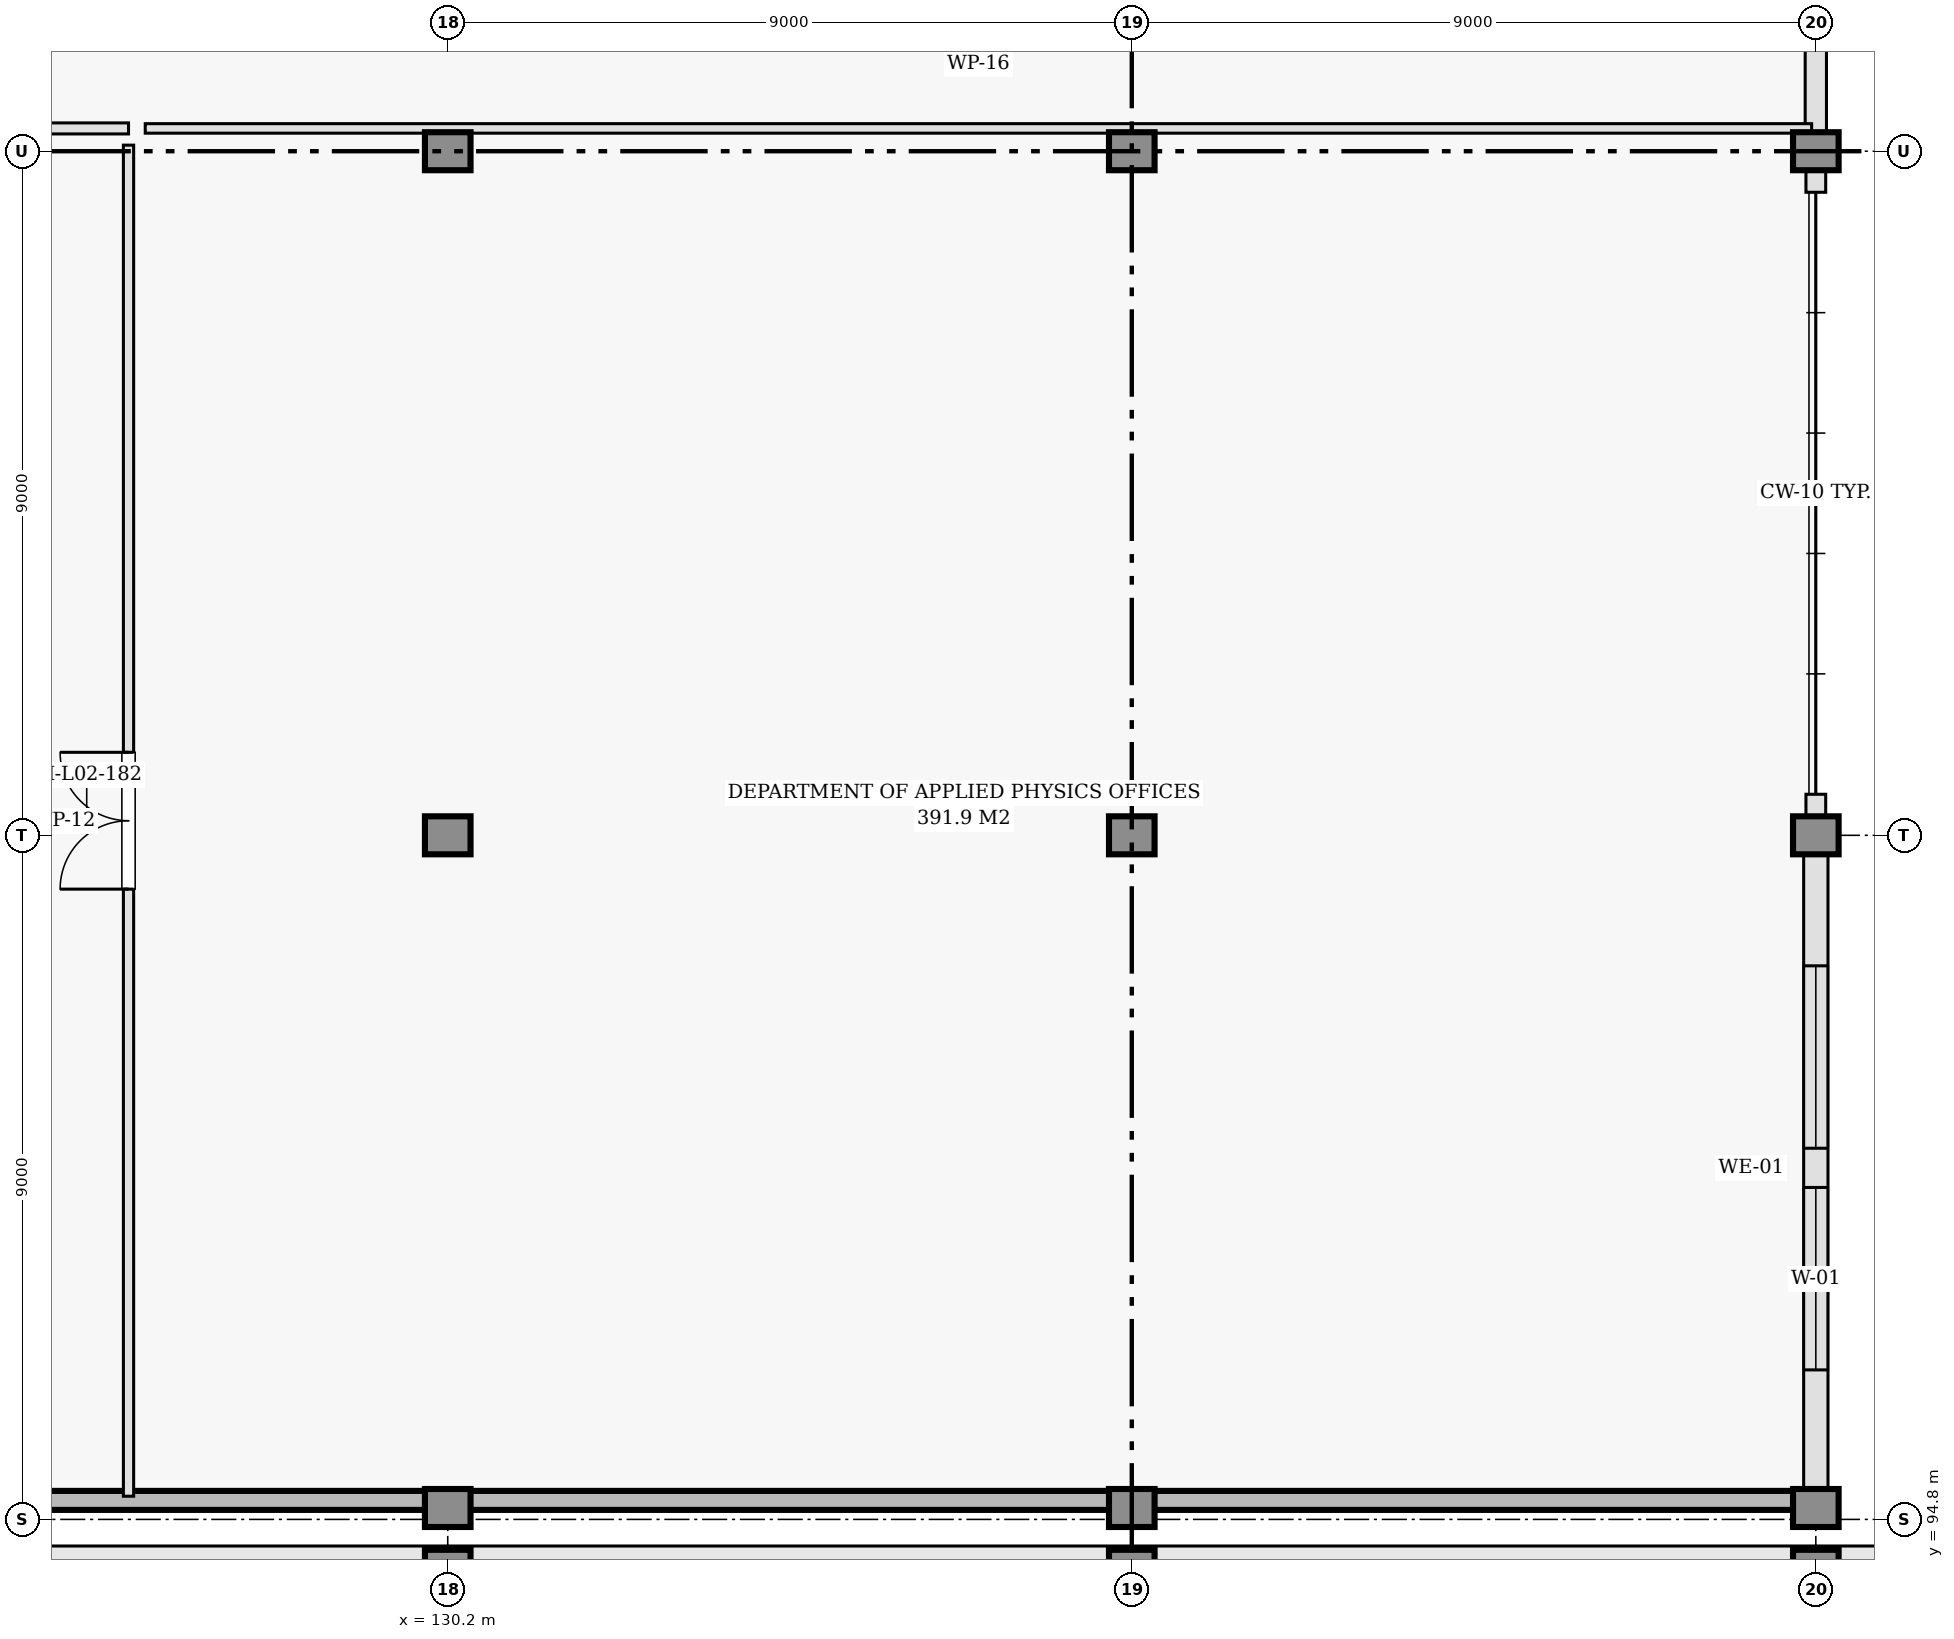
"""IFC4 building model, lengths in metres.
Left out: names, types, materials, properties, quantities, classifications, styles, units other than length and angle.
Written with IfcOpenShell. Run it as: python <this file> out.ifc"""

import sys

from ifc_helpers import new_model, si_unit, direction, frame, frame_2d, origin, origin_2d, place, context, subcontext, project, spatial, rectangle, i_section, extrude, element, fill, save


model = new_model("IFC4")
c1 = context("Model", 3, precision=1e-05, world=origin(), true_north=direction((0.0, 1.0)))
c2 = subcontext(c1, "Body", "Model", "MODEL_VIEW")
j1 = project(units=[si_unit("LENGTHUNIT", "METRE"), si_unit("PLANEANGLEUNIT", "RADIAN")], contexts=[c1])
p1 = place(None, origin())
s1 = spatial("IfcSite", under=j1, at=p1, CompositionType="ELEMENT")
p2 = place(p1, origin())
s2 = spatial("IfcBuilding", under=s1, at=p2, CompositionType="ELEMENT")
p3 = place(p2, frame((0.0, 0.0, 9.6)))
s3 = spatial("IfcBuildingStorey", under=s2, at=p3, CompositionType="ELEMENT", Elevation=9.6)
for number, where, z_axis, x_axis in (
    (1, (130.2, 94.2, 0.0), (0.0, 0.0, 1.0), (1.0, 0.0, 0.0)),
    (2, (139.2, 94.2, 0.0), (0.0, 0.0, 1.0), (1.0, 0.0, 0.0)),
    (3, (148.2, 94.2, 0.0), (0.0, 0.0, 1.0), (1.0, 0.0, 0.0)),
):
    element("IfcColumn", number, at=place(p3, frame(where, z_axis=z_axis, x_axis=x_axis)), inside=s3, PredefinedType="COLUMN", context=c2, shape_type="SweptSolid", body=[
        extrude(i_section(OverallWidth=0.3, OverallDepth=0.4, WebThickness=0.013, FlangeThickness=0.024, FilletRadius=0.027, at=origin_2d()), origin(), (0.0, 0.0, 1.0), 0.85),
    ])
for number, where, z_axis, x_axis in (
    (4, (130.2, 94.95, 0.0), (0.0, 0.0, 1.0), (1.0, 0.0, 0.0)),
    (5, (130.2, 103.8, 0.0), (0.0, 0.0, 1.0), (1.0, 0.0, 0.0)),
    (6, (130.2, 112.8, 0.0), (0.0, 0.0, 1.0), (1.0, 0.0, 0.0)),
    (7, (139.2, 94.95, 0.0), (0.0, 0.0, 1.0), (1.0, 0.0, 0.0)),
    (8, (139.2, 103.8, 0.0), (0.0, 0.0, 1.0), (1.0, 0.0, 0.0)),
    (9, (139.2, 112.8, 0.0), (0.0, 0.0, 1.0), (1.0, 0.0, 0.0)),
    (10, (148.2, 94.95, 0.0), (0.0, 0.0, 1.0), (1.0, 0.0, 0.0)),
    (11, (148.2, 103.8, 0.0), (0.0, 0.0, 1.0), (1.0, 0.0, 0.0)),
    (12, (148.2, 112.8, 0.0), (0.0, 0.0, 1.0), (1.0, 0.0, 0.0)),
):
    element("IfcColumn", number, at=place(p3, frame(where, z_axis=z_axis, x_axis=x_axis)), inside=s3, PredefinedType="COLUMN", context=c2, shape_type="SweptSolid", body=[
        extrude(rectangle(XDim=0.5, YDim=0.5, at=origin_2d()), origin(), (0.0, 0.0, 1.0), 4.2),
    ])
p4 = place(p3, frame((111.6, 95.05, 0.0), z_axis=(0.0, 0.0, 1.0), x_axis=(1.0, 0.0, 0.0)))
e13 = element("IfcWall", 13, at=p4, inside=s3, PredefinedType="SHEAR", context=c2, shape_type="SweptSolid", body=[
    extrude(rectangle(XDim=36.6, YDim=0.25, at=frame_2d((18.3, 0.0))), origin(), (0.0, 0.0, 1.0), 3.94),
])
p5 = place(p3, frame((148.2, 95.05, 0.0), z_axis=(0.0, 0.0, 1.0), x_axis=(0.0, 1.0, 0.0)))
e14 = element("IfcWall", 14, at=p5, inside=s3, PredefinedType="SOLIDWALL", context=c2, shape_type="SweptSolid", body=[
    extrude(rectangle(XDim=8.75, YDim=0.32, at=frame_2d((4.375, 0.0))), origin(), (0.0, 0.0, 1.0), 3.94),
])
p6 = place(p5, frame((1.717, 0.0, 0.95)))
e15 = element("IfcOpeningElement", 15, at=p6, cuts=e14, PredefinedType="OPENING", context=c2, shape_type="SweptSolid", body=[
    extrude(rectangle(XDim=2.4, YDim=1.8, at=frame_2d((1.2, 0.9))), frame((0.0, 0.17, 0.0), z_axis=(0.0, -1.0, 0.0), x_axis=(1.0, 0.0, 0.0)), (0.0, 0.0, 1.0), 0.34),
])
p7 = place(p5, frame((4.633, 0.0, 0.95)))
e16 = element("IfcOpeningElement", 16, at=p7, cuts=e14, PredefinedType="OPENING", context=c2, shape_type="SweptSolid", body=[
    extrude(rectangle(XDim=2.4, YDim=1.8, at=frame_2d((1.2, 0.9))), frame((0.0, 0.17, 0.0), z_axis=(0.0, -1.0, 0.0), x_axis=(1.0, 0.0, 0.0)), (0.0, 0.0, 1.0), 0.34),
])
for number, where, z_axis, x_axis in (
    (17, (148.2, 103.8, 0.0), (0.0, 0.0, 1.0), (0.0, 1.0, 0.0)),
    (18, (148.2, 112.26, 0.0), (0.0, 0.0, 1.0), (0.0, 1.0, 0.0)),
):
    element("IfcWall", number, at=place(p3, frame(where, z_axis=z_axis, x_axis=x_axis)), inside=s3, PredefinedType="SOLIDWALL", context=c2, shape_type="SweptSolid", body=[
        extrude(rectangle(XDim=0.54, YDim=0.26, at=frame_2d((0.27, 0.0))), origin(), (0.0, 0.0, 1.0), 3.94),
    ])
p8 = place(p3, frame((148.2, 112.8, 0.0), z_axis=(0.0, 0.0, 1.0), x_axis=(0.0, 1.0, 0.0)))
e19 = element("IfcWall", 19, at=p8, inside=s3, PredefinedType="SOLIDWALL", context=c2, shape_type="SweptSolid", body=[
    extrude(rectangle(XDim=9.0, YDim=0.28, at=frame_2d((4.5, 0.0))), origin(), (0.0, 0.0, 1.0), 3.94),
])
p9 = place(p8, frame((4.95, 0.0, 0.95)))
e20 = element("IfcOpeningElement", 20, at=p9, cuts=e19, PredefinedType="OPENING", context=c2, shape_type="SweptSolid", body=[
    extrude(rectangle(XDim=2.1, YDim=1.8, at=frame_2d((1.05, 0.9))), frame((0.0, 0.15, 0.0), z_axis=(0.0, -1.0, 0.0), x_axis=(1.0, 0.0, 0.0)), (0.0, 0.0, 1.0), 0.3),
])
p10 = place(p3, frame((118.146, 113.1, 0.0), z_axis=(0.0, 0.0, 1.0), x_axis=(1.0, 0.0, 0.0)))
e21 = element("IfcWall", 21, at=p10, inside=s3, PredefinedType="PARTITIONING", context=c2, shape_type="SweptSolid", body=[
    extrude(rectangle(XDim=7.854, YDim=0.145, at=frame_2d((3.927, 0.0))), origin(), (0.0, 0.0, 1.0), 3.175),
])
p11 = place(p3, frame((126.0, 95.105, 0.0), z_axis=(0.0, 0.0, 1.0), x_axis=(0.0, 1.0, 0.0)))
e22 = element("IfcWall", 22, at=p11, inside=s3, PredefinedType="PARTITIONING", context=c2, shape_type="SweptSolid", body=[
    extrude(rectangle(XDim=17.775, YDim=0.135, at=frame_2d((8.887, 0.0))), origin(), (0.0, 0.0, 1.0), 3.175),
])
p12 = place(p11, frame((7.987, 0.0, 0.0)))
e23 = element("IfcOpeningElement", 23, at=p12, cuts=e22, PredefinedType="OPENING", context=c2, shape_type="SweptSolid", body=[
    extrude(rectangle(XDim=1.8, YDim=2.2, at=frame_2d((0.9, 1.1))), frame((0.0, 0.078, 0.0), z_axis=(0.0, -1.0, 0.0), x_axis=(1.0, 0.0, 0.0)), (0.0, 0.0, 1.0), 0.155),
])
p13 = place(p3, frame((126.22, 113.1, 0.0), z_axis=(0.0, 0.0, 1.0), x_axis=(1.0, 0.0, 0.0)))
e24 = element("IfcWall", 24, at=p13, inside=s3, PredefinedType="PARTITIONING", context=c2, shape_type="SweptSolid", body=[
    extrude(rectangle(XDim=21.925, YDim=0.125, at=frame_2d((10.962, 0.0))), origin(), (0.0, 0.0, 1.0), 3.175),
])
p14 = place(p6, origin())
e25 = element("IfcWindow", 25, at=p14, inside=s3, PartitioningType="DOUBLE_PANEL_VERTICAL", PredefinedType="WINDOW", context=c2, shape_type="SweptSolid", body=[
    extrude(rectangle(XDim=2.4, YDim=1.8, at=frame_2d((1.2, 0.9))), frame((0.0, 0.03, 0.0), z_axis=(0.0, -1.0, 0.0), x_axis=(1.0, 0.0, 0.0)), (0.0, 0.0, 1.0), 0.06),
])
fill(e15, e25)
p15 = place(p7, origin())
e26 = element("IfcWindow", 26, at=p15, inside=s3, PartitioningType="DOUBLE_PANEL_VERTICAL", PredefinedType="WINDOW", context=c2, shape_type="SweptSolid", body=[
    extrude(rectangle(XDim=2.4, YDim=1.8, at=frame_2d((1.2, 0.9))), frame((0.0, 0.03, 0.0), z_axis=(0.0, -1.0, 0.0), x_axis=(1.0, 0.0, 0.0)), (0.0, 0.0, 1.0), 0.06),
])
fill(e16, e26)
p16 = place(p12, origin())
e27 = element("IfcDoor", 27, at=p16, inside=s3, OperationType="DOUBLE_DOOR_SINGLE_SWING", PredefinedType="DOOR", context=c2, shape_type="SweptSolid", body=[
    extrude(rectangle(XDim=1.8, YDim=2.2, at=frame_2d((0.9, 1.1))), frame((0.0, 0.025, 0.0), z_axis=(0.0, -1.0, 0.0), x_axis=(1.0, 0.0, 0.0)), (0.0, 0.0, 1.0), 0.05),
])
fill(e23, e27)
save(model, sys.argv[1])
